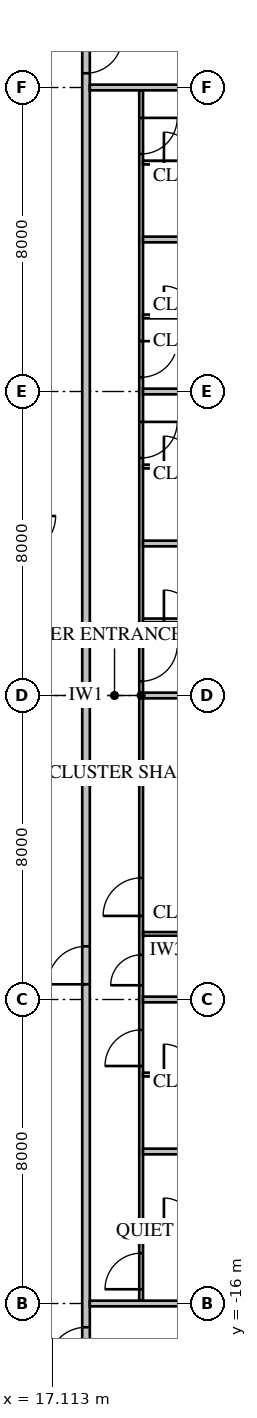
"""IFC4 building model, lengths in metres.
Left out: names, types, materials, properties, quantities, classifications, styles, units other than length and angle.
Written with IfcOpenShell. Run it as: python <this file> out.ifc"""

import sys

from ifc_helpers import new_model, si_unit, direction, frame, frame_2d, origin, place, context, subcontext, project, spatial, rectangle, extrude, element, fill, save


model = new_model("IFC4")
c1 = context("Model", 3, precision=1e-05, world=origin(), true_north=direction((0.0, 1.0)))
c2 = subcontext(c1, "Body", "Model", "MODEL_VIEW")
j1 = project(units=[si_unit("LENGTHUNIT", "METRE"), si_unit("PLANEANGLEUNIT", "RADIAN")], contexts=[c1])
p1 = place(None, origin())
s1 = spatial("IfcSite", under=j1, at=p1, CompositionType="ELEMENT")
p2 = place(p1, origin())
s2 = spatial("IfcBuilding", under=s1, at=p2, CompositionType="ELEMENT")
p3 = place(p2, frame((0.0, 0.0, 39.1)))
s3 = spatial("IfcBuildingStorey", under=s2, at=p3, CompositionType="ELEMENT", Elevation=39.1)
p4 = place(p3, frame((18.0, -18.0, 0.0), z_axis=(0.0, 0.0, 1.0), x_axis=(0.0, 1.0, 0.0)))
e1 = element("IfcWall", 1, at=p4, inside=s3, PredefinedType="PARTITIONING", context=c2, shape_type="SweptSolid", body=[
    extrude(rectangle(XDim=36.0, YDim=0.2, at=frame_2d((18.0, 0.0))), origin(), (0.0, 0.0, 1.0), 3.65),
])
p5 = place(p4, frame((10.4, 0.0, 0.0)))
e2 = element("IfcOpeningElement", 2, at=p5, cuts=e1, PredefinedType="OPENING", context=c2, shape_type="SweptSolid", body=[
    extrude(rectangle(XDim=1.0, YDim=2.1, at=frame_2d((0.5, 1.05))), frame((0.0, 0.12, 0.0), z_axis=(0.0, -1.0, 0.0), x_axis=(1.0, 0.0, 0.0)), (0.0, 0.0, 1.0), 0.24),
])
p6 = place(p4, frame((0.375, 0.0, 0.0)))
e3 = element("IfcOpeningElement", 3, at=p6, cuts=e1, PredefinedType="OPENING", context=c2, shape_type="SweptSolid", body=[
    extrude(rectangle(XDim=1.0, YDim=2.1, at=frame_2d((0.5, 1.05))), frame((0.0, 0.12, 0.0), z_axis=(0.0, -1.0, 0.0), x_axis=(1.0, 0.0, 0.0)), (0.0, 0.0, 1.0), 0.24),
])
p7 = place(p4, frame((34.375, 0.0, 0.0)))
e4 = element("IfcOpeningElement", 4, at=p7, cuts=e1, PredefinedType="OPENING", context=c2, shape_type="SweptSolid", body=[
    extrude(rectangle(XDim=0.95, YDim=2.1, at=frame_2d((0.475, 1.05))), frame((0.0, 0.12, 0.0), z_axis=(0.0, -1.0, 0.0), x_axis=(1.0, 0.0, 0.0)), (0.0, 0.0, 1.0), 0.24),
])
p8 = place(p3, frame((19.45, -15.925, 0.0), z_axis=(0.0, 0.0, 1.0), x_axis=(0.0, 1.0, 0.0)))
e5 = element("IfcWall", 5, at=p8, inside=s3, PredefinedType="PARTITIONING", context=c2, shape_type="SweptSolid", body=[
    extrude(rectangle(XDim=31.85, YDim=0.1, at=frame_2d((15.925, 0.0))), origin(), (0.0, 0.0, 1.0), 3.65),
])
p9 = place(p8, frame((10.125, 0.0, 0.0)))
e6 = element("IfcOpeningElement", 6, at=p9, cuts=e5, PredefinedType="OPENING", context=c2, shape_type="SweptSolid", body=[
    extrude(rectangle(XDim=1.0, YDim=2.1, at=frame_2d((0.5, 1.05))), frame((0.0, 0.07, 0.0), z_axis=(0.0, -1.0, 0.0), x_axis=(1.0, 0.0, 0.0)), (0.0, 0.0, 1.0), 0.14),
])
p10 = place(p8, frame((8.3, 0.0, 0.0)))
e7 = element("IfcOpeningElement", 7, at=p10, cuts=e5, PredefinedType="OPENING", context=c2, shape_type="SweptSolid", body=[
    extrude(rectangle(XDim=0.8, YDim=2.1, at=frame_2d((0.4, 1.05))), frame((0.0, 0.07, 0.0), z_axis=(0.0, -1.0, 0.0), x_axis=(1.0, 0.0, 0.0)), (0.0, 0.0, 1.0), 0.14),
])
p11 = place(p8, frame((0.3, 0.0, 0.0)))
e8 = element("IfcOpeningElement", 8, at=p11, cuts=e5, PredefinedType="OPENING", context=c2, shape_type="SweptSolid", body=[
    extrude(rectangle(XDim=0.95, YDim=2.1, at=frame_2d((0.475, 1.05))), frame((0.0, 0.07, 0.0), z_axis=(0.0, -1.0, 0.0), x_axis=(1.0, 0.0, 0.0)), (0.0, 0.0, 1.0), 0.14),
])
p12 = place(p8, frame((6.175, 0.0, 0.0)))
e9 = element("IfcOpeningElement", 9, at=p12, cuts=e5, PredefinedType="OPENING", context=c2, shape_type="SweptSolid", body=[
    extrude(rectangle(XDim=0.95, YDim=2.1, at=frame_2d((0.475, 1.05))), frame((0.0, 0.07, 0.0), z_axis=(0.0, -1.0, 0.0), x_axis=(1.0, 0.0, 0.0)), (0.0, 0.0, 1.0), 0.14),
])
p13 = place(p8, frame((16.3, 0.0, 0.0)))
e10 = element("IfcOpeningElement", 10, at=p13, cuts=e5, PredefinedType="OPENING", context=c2, shape_type="SweptSolid", body=[
    extrude(rectangle(XDim=0.95, YDim=2.1, at=frame_2d((0.475, 1.05))), frame((0.0, 0.07, 0.0), z_axis=(0.0, -1.0, 0.0), x_axis=(1.0, 0.0, 0.0)), (0.0, 0.0, 1.0), 0.14),
])
p14 = place(p8, frame((22.175, 0.0, 0.0)))
e11 = element("IfcOpeningElement", 11, at=p14, cuts=e5, PredefinedType="OPENING", context=c2, shape_type="SweptSolid", body=[
    extrude(rectangle(XDim=0.95, YDim=2.1, at=frame_2d((0.475, 1.05))), frame((0.0, 0.07, 0.0), z_axis=(0.0, -1.0, 0.0), x_axis=(1.0, 0.0, 0.0)), (0.0, 0.0, 1.0), 0.14),
])
p15 = place(p8, frame((24.3, 0.0, 0.0)))
e12 = element("IfcOpeningElement", 12, at=p15, cuts=e5, PredefinedType="OPENING", context=c2, shape_type="SweptSolid", body=[
    extrude(rectangle(XDim=0.95, YDim=2.1, at=frame_2d((0.475, 1.05))), frame((0.0, 0.07, 0.0), z_axis=(0.0, -1.0, 0.0), x_axis=(1.0, 0.0, 0.0)), (0.0, 0.0, 1.0), 0.14),
])
p16 = place(p8, frame((30.175, 0.0, 0.0)))
e13 = element("IfcOpeningElement", 13, at=p16, cuts=e5, PredefinedType="OPENING", context=c2, shape_type="SweptSolid", body=[
    extrude(rectangle(XDim=0.95, YDim=2.1, at=frame_2d((0.475, 1.05))), frame((0.0, 0.07, 0.0), z_axis=(0.0, -1.0, 0.0), x_axis=(1.0, 0.0, 0.0)), (0.0, 0.0, 1.0), 0.14),
])
p17 = place(p3, frame((19.5, -6.275, 0.0), z_axis=(0.0, 0.0, 1.0), x_axis=(1.0, 0.0, 0.0)))
e14 = element("IfcWall", 14, at=p17, inside=s3, PredefinedType="PARTITIONING", context=c2, shape_type="SweptSolid", body=[
    extrude(rectangle(XDim=2.1, YDim=0.1, at=frame_2d((1.05, 0.0))), origin(), (0.0, 0.0, 1.0), 3.65),
])
p18 = place(p3, frame((18.1, -16.0, 0.0), z_axis=(0.0, 0.0, 1.0), x_axis=(1.0, 0.0, 0.0)))
e15 = element("IfcWall", 15, at=p18, inside=s3, PredefinedType="PARTITIONING", context=c2, shape_type="SweptSolid", body=[
    extrude(rectangle(XDim=6.589, YDim=0.15, at=frame_2d((3.295, 0.0))), origin(), (0.0, 0.0, 1.0), 3.65),
])
for number, where, z_axis, x_axis in (
    (16, (19.5, -12.0, 0.0), (0.0, 0.0, 1.0), (1.0, 0.0, 0.0)),
    (17, (19.5, -8.0, 0.0), (0.0, 0.0, 1.0), (1.0, 0.0, 0.0)),
):
    element("IfcWall", number, at=place(p3, frame(where, z_axis=z_axis, x_axis=x_axis)), inside=s3, PredefinedType="PARTITIONING", context=c2, shape_type="SweptSolid", body=[
        extrude(rectangle(XDim=5.2, YDim=0.15, at=frame_2d((2.6, 0.0))), origin(), (0.0, 0.0, 1.0), 3.65),
    ])
p19 = place(p3, frame((19.5, 0.0, 0.0), z_axis=(0.0, 0.0, 1.0), x_axis=(1.0, 0.0, 0.0)))
e18 = element("IfcWall", 18, at=p19, inside=s3, PredefinedType="PARTITIONING", context=c2, shape_type="SweptSolid", body=[
    extrude(rectangle(XDim=5.2, YDim=0.15, at=frame_2d((2.6, 0.0))), origin(), (0.0, 0.0, 1.0), 2.957),
])
for number, where, z_axis, x_axis in (
    (19, (19.5, 4.0, 0.0), (0.0, 0.0, 1.0), (1.0, 0.0, 0.0)),
    (20, (19.5, 8.0, 0.0), (0.0, 0.0, 1.0), (1.0, 0.0, 0.0)),
    (21, (19.5, 12.0, 0.0), (0.0, 0.0, 1.0), (1.0, 0.0, 0.0)),
):
    element("IfcWall", number, at=place(p3, frame(where, z_axis=z_axis, x_axis=x_axis)), inside=s3, PredefinedType="PARTITIONING", context=c2, shape_type="SweptSolid", body=[
        extrude(rectangle(XDim=5.2, YDim=0.15, at=frame_2d((2.6, 0.0))), origin(), (0.0, 0.0, 1.0), 3.65),
    ])
p20 = place(p3, frame((18.1, 16.0, 0.0), z_axis=(0.0, 0.0, 1.0), x_axis=(1.0, 0.0, 0.0)))
e22 = element("IfcWall", 22, at=p20, inside=s3, PredefinedType="PARTITIONING", context=c2, shape_type="SweptSolid", body=[
    extrude(rectangle(XDim=6.589, YDim=0.15, at=frame_2d((3.295, 0.0))), origin(), (0.0, 0.0, 1.0), 3.65),
])
p21 = place(p3, frame((19.5, -14.025, 0.0), z_axis=(0.0, 0.0, 1.0), x_axis=(1.0, 0.0, 0.0)))
e23 = element("IfcWall", 23, at=p21, inside=s3, PredefinedType="PARTITIONING", context=c2, shape_type="SweptSolid", body=[
    extrude(rectangle(XDim=2.0, YDim=0.1, at=frame_2d((1.0, 0.0))), origin(), (0.0, 0.0, 1.0), 3.65),
])
p22 = place(p21, frame((0.55, 0.0, 0.0)))
e24 = element("IfcOpeningElement", 24, at=p22, cuts=e23, PredefinedType="OPENING", context=c2, shape_type="SweptSolid", body=[
    extrude(rectangle(XDim=0.8, YDim=2.1, at=frame_2d((0.4, 1.05))), frame((0.0, 0.07, 0.0), z_axis=(0.0, -1.0, 0.0), x_axis=(1.0, 0.0, 0.0)), (0.0, 0.0, 1.0), 0.14),
])
p23 = place(p3, frame((19.5, -9.975, 0.0), z_axis=(0.0, 0.0, 1.0), x_axis=(1.0, 0.0, 0.0)))
e25 = element("IfcWall", 25, at=p23, inside=s3, PredefinedType="PARTITIONING", context=c2, shape_type="SweptSolid", body=[
    extrude(rectangle(XDim=2.0, YDim=0.1, at=frame_2d((1.0, 0.0))), origin(), (0.0, 0.0, 1.0), 3.65),
])
p24 = place(p23, frame((0.55, 0.0, 0.0)))
e26 = element("IfcOpeningElement", 26, at=p24, cuts=e25, PredefinedType="OPENING", context=c2, shape_type="SweptSolid", body=[
    extrude(rectangle(XDim=0.8, YDim=2.1, at=frame_2d((0.4, 1.05))), frame((0.0, 0.07, 0.0), z_axis=(0.0, -1.0, 0.0), x_axis=(1.0, 0.0, 0.0)), (0.0, 0.0, 1.0), 0.14),
])
p25 = place(p3, frame((19.5, 1.975, 0.0), z_axis=(0.0, 0.0, 1.0), x_axis=(1.0, 0.0, 0.0)))
e27 = element("IfcWall", 27, at=p25, inside=s3, PredefinedType="PARTITIONING", context=c2, shape_type="SweptSolid", body=[
    extrude(rectangle(XDim=2.0, YDim=0.1, at=frame_2d((1.0, 0.0))), origin(), (0.0, 0.0, 1.0), 3.65),
])
p26 = place(p25, frame((0.55, 0.0, 0.0)))
e28 = element("IfcOpeningElement", 28, at=p26, cuts=e27, PredefinedType="OPENING", context=c2, shape_type="SweptSolid", body=[
    extrude(rectangle(XDim=0.8, YDim=2.1, at=frame_2d((0.4, 1.05))), frame((0.0, 0.07, 0.0), z_axis=(0.0, -1.0, 0.0), x_axis=(1.0, 0.0, 0.0)), (0.0, 0.0, 1.0), 0.14),
])
p27 = place(p3, frame((19.5, 6.025, 0.0), z_axis=(0.0, 0.0, 1.0), x_axis=(1.0, 0.0, 0.0)))
e29 = element("IfcWall", 29, at=p27, inside=s3, PredefinedType="PARTITIONING", context=c2, shape_type="SweptSolid", body=[
    extrude(rectangle(XDim=2.0, YDim=0.1, at=frame_2d((1.0, 0.0))), origin(), (0.0, 0.0, 1.0), 3.65),
])
p28 = place(p27, frame((0.55, 0.0, 0.0)))
e30 = element("IfcOpeningElement", 30, at=p28, cuts=e29, PredefinedType="OPENING", context=c2, shape_type="SweptSolid", body=[
    extrude(rectangle(XDim=0.8, YDim=2.1, at=frame_2d((0.4, 1.05))), frame((0.0, 0.07, 0.0), z_axis=(0.0, -1.0, 0.0), x_axis=(1.0, 0.0, 0.0)), (0.0, 0.0, 1.0), 0.14),
])
p29 = place(p3, frame((19.5, 9.975, 0.0), z_axis=(0.0, 0.0, 1.0), x_axis=(1.0, 0.0, 0.0)))
e31 = element("IfcWall", 31, at=p29, inside=s3, PredefinedType="PARTITIONING", context=c2, shape_type="SweptSolid", body=[
    extrude(rectangle(XDim=2.0, YDim=0.1, at=frame_2d((1.0, 0.0))), origin(), (0.0, 0.0, 1.0), 3.65),
])
p30 = place(p29, frame((0.55, 0.0, 0.0)))
e32 = element("IfcOpeningElement", 32, at=p30, cuts=e31, PredefinedType="OPENING", context=c2, shape_type="SweptSolid", body=[
    extrude(rectangle(XDim=0.8, YDim=2.1, at=frame_2d((0.4, 1.05))), frame((0.0, 0.07, 0.0), z_axis=(0.0, -1.0, 0.0), x_axis=(1.0, 0.0, 0.0)), (0.0, 0.0, 1.0), 0.14),
])
p31 = place(p3, frame((19.5, 14.025, 0.0), z_axis=(0.0, 0.0, 1.0), x_axis=(1.0, 0.0, 0.0)))
e33 = element("IfcWall", 33, at=p31, inside=s3, PredefinedType="PARTITIONING", context=c2, shape_type="SweptSolid", body=[
    extrude(rectangle(XDim=2.0, YDim=0.1, at=frame_2d((1.0, 0.0))), origin(), (0.0, 0.0, 1.0), 3.65),
])
p32 = place(p31, frame((0.55, 0.0, 0.0)))
e34 = element("IfcOpeningElement", 34, at=p32, cuts=e33, PredefinedType="OPENING", context=c2, shape_type="SweptSolid", body=[
    extrude(rectangle(XDim=0.8, YDim=2.1, at=frame_2d((0.4, 1.05))), frame((0.0, 0.07, 0.0), z_axis=(0.0, -1.0, 0.0), x_axis=(1.0, 0.0, 0.0)), (0.0, 0.0, 1.0), 0.14),
])
p33 = place(p5, origin())
e35 = element("IfcDoor", 35, at=p33, inside=s3, OperationType="SINGLE_SWING_LEFT", PredefinedType="DOOR", context=c2, shape_type="SweptSolid", body=[
    extrude(rectangle(XDim=1.0, YDim=2.1, at=frame_2d((0.5, 1.05))), frame((0.0, 0.025, 0.0), z_axis=(0.0, -1.0, 0.0), x_axis=(1.0, 0.0, 0.0)), (0.0, 0.0, 1.0), 0.05),
])
fill(e2, e35)
p34 = place(p9, origin())
e36 = element("IfcDoor", 36, at=p34, inside=s3, OperationType="SINGLE_SWING_LEFT", PredefinedType="DOOR", context=c2, shape_type="SweptSolid", body=[
    extrude(rectangle(XDim=1.0, YDim=2.1, at=frame_2d((0.5, 1.05))), frame((0.0, 0.025, 0.0), z_axis=(0.0, -1.0, 0.0), x_axis=(1.0, 0.0, 0.0)), (0.0, 0.0, 1.0), 0.05),
])
fill(e6, e36)
p35 = place(p10, origin())
e37 = element("IfcDoor", 37, at=p35, inside=s3, OperationType="SINGLE_SWING_LEFT", PredefinedType="DOOR", context=c2, shape_type="SweptSolid", body=[
    extrude(rectangle(XDim=0.8, YDim=2.1, at=frame_2d((0.4, 1.05))), frame((0.0, 0.025, 0.0), z_axis=(0.0, -1.0, 0.0), x_axis=(1.0, 0.0, 0.0)), (0.0, 0.0, 1.0), 0.05),
])
fill(e7, e37)
p36 = place(p6, origin())
e38 = element("IfcDoor", 38, at=p36, inside=s3, OperationType="SINGLE_SWING_LEFT", PredefinedType="DOOR", context=c2, shape_type="SweptSolid", body=[
    extrude(rectangle(XDim=1.0, YDim=2.1, at=frame_2d((0.5, 1.05))), frame((0.0, 0.025, 0.0), z_axis=(0.0, -1.0, 0.0), x_axis=(1.0, 0.0, 0.0)), (0.0, 0.0, 1.0), 0.05),
])
fill(e3, e38)
p37 = place(p11, origin())
e39 = element("IfcDoor", 39, at=p37, inside=s3, OperationType="SINGLE_SWING_LEFT", PredefinedType="DOOR", context=c2, shape_type="SweptSolid", body=[
    extrude(rectangle(XDim=0.95, YDim=2.1, at=frame_2d((0.475, 1.05))), frame((0.0, 0.025, 0.0), z_axis=(0.0, -1.0, 0.0), x_axis=(1.0, 0.0, 0.0)), (0.0, 0.0, 1.0), 0.05),
])
fill(e8, e39)
p38 = place(p22, origin())
e40 = element("IfcDoor", 40, at=p38, inside=s3, OperationType="SINGLE_SWING_LEFT", PredefinedType="DOOR", context=c2, shape_type="SweptSolid", body=[
    extrude(rectangle(XDim=0.8, YDim=2.1, at=frame_2d((0.4, 1.05))), frame((0.0, 0.025, 0.0), z_axis=(0.0, -1.0, 0.0), x_axis=(1.0, 0.0, 0.0)), (0.0, 0.0, 1.0), 0.05),
])
fill(e24, e40)
p39 = place(p12, origin())
e41 = element("IfcDoor", 41, at=p39, inside=s3, OperationType="SINGLE_SWING_LEFT", PredefinedType="DOOR", context=c2, shape_type="SweptSolid", body=[
    extrude(rectangle(XDim=0.95, YDim=2.1, at=frame_2d((0.475, 1.05))), frame((0.0, 0.025, 0.0), z_axis=(0.0, -1.0, 0.0), x_axis=(1.0, 0.0, 0.0)), (0.0, 0.0, 1.0), 0.05),
])
fill(e9, e41)
p40 = place(p24, origin())
e42 = element("IfcDoor", 42, at=p40, inside=s3, OperationType="SINGLE_SWING_LEFT", PredefinedType="DOOR", context=c2, shape_type="SweptSolid", body=[
    extrude(rectangle(XDim=0.8, YDim=2.1, at=frame_2d((0.4, 1.05))), frame((0.0, 0.025, 0.0), z_axis=(0.0, -1.0, 0.0), x_axis=(1.0, 0.0, 0.0)), (0.0, 0.0, 1.0), 0.05),
])
fill(e26, e42)
p41 = place(p13, origin())
e43 = element("IfcDoor", 43, at=p41, inside=s3, OperationType="SINGLE_SWING_RIGHT", PredefinedType="DOOR", context=c2, shape_type="SweptSolid", body=[
    extrude(rectangle(XDim=0.95, YDim=2.1, at=frame_2d((0.475, 1.05))), frame((0.0, 0.025, 0.0), z_axis=(0.0, -1.0, 0.0), x_axis=(1.0, 0.0, 0.0)), (0.0, 0.0, 1.0), 0.05),
])
fill(e10, e43)
p42 = place(p26, origin())
e44 = element("IfcDoor", 44, at=p42, inside=s3, OperationType="SINGLE_SWING_LEFT", PredefinedType="DOOR", context=c2, shape_type="SweptSolid", body=[
    extrude(rectangle(XDim=0.8, YDim=2.1, at=frame_2d((0.4, 1.05))), frame((0.0, 0.025, 0.0), z_axis=(0.0, -1.0, 0.0), x_axis=(1.0, 0.0, 0.0)), (0.0, 0.0, 1.0), 0.05),
])
fill(e28, e44)
p43 = place(p14, origin())
e45 = element("IfcDoor", 45, at=p43, inside=s3, OperationType="SINGLE_SWING_RIGHT", PredefinedType="DOOR", context=c2, shape_type="SweptSolid", body=[
    extrude(rectangle(XDim=0.95, YDim=2.1, at=frame_2d((0.475, 1.05))), frame((0.0, 0.025, 0.0), z_axis=(0.0, -1.0, 0.0), x_axis=(1.0, 0.0, 0.0)), (0.0, 0.0, 1.0), 0.05),
])
fill(e11, e45)
p44 = place(p28, origin())
e46 = element("IfcDoor", 46, at=p44, inside=s3, OperationType="SINGLE_SWING_LEFT", PredefinedType="DOOR", context=c2, shape_type="SweptSolid", body=[
    extrude(rectangle(XDim=0.8, YDim=2.1, at=frame_2d((0.4, 1.05))), frame((0.0, 0.025, 0.0), z_axis=(0.0, -1.0, 0.0), x_axis=(1.0, 0.0, 0.0)), (0.0, 0.0, 1.0), 0.05),
])
fill(e30, e46)
p45 = place(p15, origin())
e47 = element("IfcDoor", 47, at=p45, inside=s3, OperationType="SINGLE_SWING_RIGHT", PredefinedType="DOOR", context=c2, shape_type="SweptSolid", body=[
    extrude(rectangle(XDim=0.95, YDim=2.1, at=frame_2d((0.475, 1.05))), frame((0.0, 0.025, 0.0), z_axis=(0.0, -1.0, 0.0), x_axis=(1.0, 0.0, 0.0)), (0.0, 0.0, 1.0), 0.05),
])
fill(e12, e47)
p46 = place(p30, origin())
e48 = element("IfcDoor", 48, at=p46, inside=s3, OperationType="SINGLE_SWING_LEFT", PredefinedType="DOOR", context=c2, shape_type="SweptSolid", body=[
    extrude(rectangle(XDim=0.8, YDim=2.1, at=frame_2d((0.4, 1.05))), frame((0.0, 0.025, 0.0), z_axis=(0.0, -1.0, 0.0), x_axis=(1.0, 0.0, 0.0)), (0.0, 0.0, 1.0), 0.05),
])
fill(e32, e48)
p47 = place(p16, origin())
e49 = element("IfcDoor", 49, at=p47, inside=s3, OperationType="SINGLE_SWING_RIGHT", PredefinedType="DOOR", context=c2, shape_type="SweptSolid", body=[
    extrude(rectangle(XDim=0.95, YDim=2.1, at=frame_2d((0.475, 1.05))), frame((0.0, 0.025, 0.0), z_axis=(0.0, -1.0, 0.0), x_axis=(1.0, 0.0, 0.0)), (0.0, 0.0, 1.0), 0.05),
])
fill(e13, e49)
p48 = place(p32, origin())
e50 = element("IfcDoor", 50, at=p48, inside=s3, OperationType="SINGLE_SWING_LEFT", PredefinedType="DOOR", context=c2, shape_type="SweptSolid", body=[
    extrude(rectangle(XDim=0.8, YDim=2.1, at=frame_2d((0.4, 1.05))), frame((0.0, 0.025, 0.0), z_axis=(0.0, -1.0, 0.0), x_axis=(1.0, 0.0, 0.0)), (0.0, 0.0, 1.0), 0.05),
])
fill(e34, e50)
p49 = place(p7, origin())
e51 = element("IfcDoor", 51, at=p49, inside=s3, OperationType="SINGLE_SWING_RIGHT", PredefinedType="DOOR", context=c2, shape_type="SweptSolid", body=[
    extrude(rectangle(XDim=0.95, YDim=2.1, at=frame_2d((0.475, 1.05))), frame((0.0, 0.025, 0.0), z_axis=(0.0, -1.0, 0.0), x_axis=(1.0, 0.0, 0.0)), (0.0, 0.0, 1.0), 0.05),
])
fill(e4, e51)
save(model, sys.argv[1])
